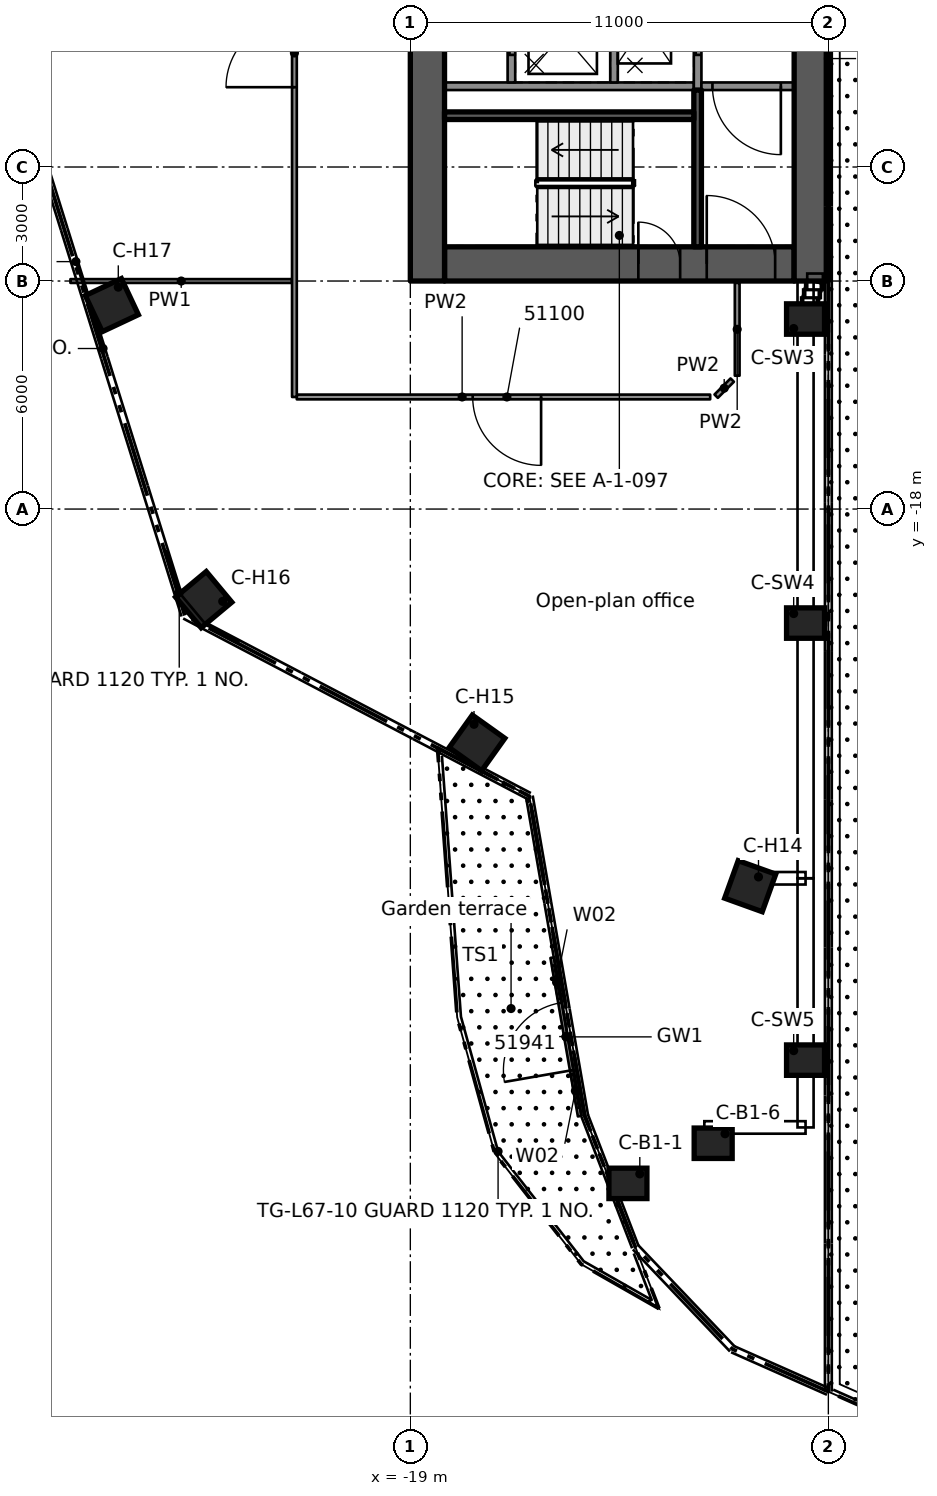
"""IFC4 building model, lengths in metres.
Left out: names, types, materials, properties, quantities, classifications, styles, units other than length and angle.
Written with IfcOpenShell. Run it as: python <this file> out.ifc"""

import sys

from ifc_helpers import new_model, si_unit, direction, frame, frame_2d, origin, origin_2d, place, context, subcontext, project, spatial, rectangle, extrude, element, fill, save


model = new_model("IFC4")
c1 = context("Model", 3, precision=1e-05, world=origin(), true_north=direction((0.0, 1.0)))
c2 = subcontext(c1, "Body", "Model", "MODEL_VIEW")
j1 = project(units=[si_unit("LENGTHUNIT", "METRE"), si_unit("PLANEANGLEUNIT", "RADIAN")], contexts=[c1])
p1 = place(None, origin())
s1 = spatial("IfcSite", under=j1, at=p1, CompositionType="ELEMENT")
p2 = place(p1, origin())
s2 = spatial("IfcBuilding", under=s1, at=p2, CompositionType="ELEMENT")
p3 = place(p2, frame((0.0, 0.0, 253.5)))
s3 = spatial("IfcBuildingStorey", under=s2, at=p3, CompositionType="ELEMENT", Elevation=253.5)
p4 = place(p3, frame((-18.1, -11.55, 0.0), z_axis=(0.0, 0.0, 1.0), x_axis=(1.0, 0.0, 0.0)))
e1 = element("IfcWall", 1, at=p4, inside=s3, PredefinedType="SHEAR", context=c2, shape_type="SweptSolid", body=[
    extrude(rectangle(XDim=9.2, YDim=0.9, at=frame_2d((4.6, 0.0))), origin(), (0.0, 0.0, 1.0), 3.5),
])
p5 = place(p4, frame((6.9, 0.0, 0.0)))
e2 = element("IfcOpeningElement", 2, at=p5, cuts=e1, PredefinedType="OPENING", context=c2, shape_type="SweptSolid", body=[
    extrude(rectangle(XDim=1.8, YDim=2.1, at=frame_2d((0.9, 1.05))), frame((0.0, 0.46, 0.0), z_axis=(0.0, -1.0, 0.0), x_axis=(1.0, 0.0, 0.0)), (0.0, 0.0, 1.0), 0.92),
])
p6 = place(p4, frame((5.1, 0.0, 0.0)))
e3 = element("IfcOpeningElement", 3, at=p6, cuts=e1, PredefinedType="OPENING", context=c2, shape_type="SweptSolid", body=[
    extrude(rectangle(XDim=1.1, YDim=2.1, at=frame_2d((0.55, 1.05))), frame((0.0, 0.46, 0.0), z_axis=(0.0, -1.0, 0.0), x_axis=(1.0, 0.0, 0.0)), (0.0, 0.0, 1.0), 0.92),
])
p7 = place(p3, frame((-18.55, -12.0, 0.0), z_axis=(0.0, 0.0, 1.0), x_axis=(0.0, 1.0, 0.0)))
e4 = element("IfcWall", 4, at=p7, inside=s3, PredefinedType="SHEAR", context=c2, shape_type="SweptSolid", body=[
    extrude(rectangle(XDim=24.0, YDim=0.9, at=frame_2d((12.0, 0.0))), origin(), (0.0, 0.0, 1.0), 3.5),
])
p8 = place(p7, frame((10.1, 0.0, 0.0)))
e5 = element("IfcOpeningElement", 5, at=p8, cuts=e4, PredefinedType="OPENING", context=c2, shape_type="SweptSolid", body=[
    extrude(rectangle(XDim=1.8, YDim=2.1, at=frame_2d((0.9, 1.05))), frame((0.0, 0.46, 0.0), z_axis=(0.0, -1.0, 0.0), x_axis=(1.0, 0.0, 0.0)), (0.0, 0.0, 1.0), 0.92),
])
p9 = place(p3, frame((-8.45, -12.0, 0.0), z_axis=(0.0, 0.0, 1.0), x_axis=(0.0, 1.0, 0.0)))
e6 = element("IfcWall", 6, at=p9, inside=s3, PredefinedType="SHEAR", context=c2, shape_type="SweptSolid", body=[
    extrude(rectangle(XDim=24.0, YDim=0.9, at=frame_2d((12.0, 0.0))), origin(), (0.0, 0.0, 1.0), 3.5),
])
for number, where, z_axis, x_axis in (
    (7, (-13.274, -35.743, 0.0), (0.0, 0.0, 1.0), (1.0, 0.0, 0.0)),
    (8, (-11.031, -34.687, 0.0), (0.0, 0.0, 1.0), (1.0, 0.0, 0.0)),
):
    element("IfcColumn", number, at=place(p3, frame(where, z_axis=z_axis, x_axis=x_axis)), inside=s3, PredefinedType="COLUMN", context=c2, shape_type="SweptSolid", body=[
        extrude(rectangle(XDim=1.0, YDim=0.8, at=origin_2d()), origin(), (0.0, 0.0, 1.0), 3.5),
    ])
for number, where, z_axis, x_axis in (
    (9, (-10.056, -27.923, 0.0), (0.0, 0.0, 1.0), (-0.339, -0.941, 0.0)),
    (10, (-17.246, -24.154, 0.0), (0.0, 0.0, 1.0), (-0.581, -0.814, 0.0)),
    (11, (-24.437, -20.384, 0.0), (0.0, 0.0, 1.0), (-0.768, -0.641, 0.0)),
    (12, (-26.855, -12.634, 0.0), (0.0, 0.0, 1.0), (-0.905, -0.426, 0.0)),
):
    element("IfcColumn", number, at=place(p3, frame(where, z_axis=z_axis, x_axis=x_axis)), inside=s3, PredefinedType="COLUMN", context=c2, shape_type="SweptSolid", body=[
        extrude(rectangle(XDim=1.05, YDim=1.05, at=origin_2d()), origin(), (0.0, 0.0, 1.0), 3.5),
    ])
for number, where, z_axis, x_axis in (
    (13, (-8.6, -13.0, 0.0), (0.0, 0.0, 1.0), (1.0, 0.0, 0.0)),
    (14, (-8.6, -21.0, 0.0), (0.0, 0.0, 1.0), (1.0, 0.0, 0.0)),
    (15, (-8.6, -32.5, 0.0), (0.0, 0.0, 1.0), (1.0, 0.0, 0.0)),
):
    element("IfcColumn", number, at=place(p3, frame(where, z_axis=z_axis, x_axis=x_axis)), inside=s3, PredefinedType="COLUMN", context=c2, shape_type="SweptSolid", body=[
        extrude(rectangle(XDim=1.0, YDim=0.8, at=origin_2d()), origin(), (0.0, 0.0, 1.0), 3.5),
    ])
p10 = place(p3, frame((-11.54, -6.875, 0.0), z_axis=(0.0, 0.0, 1.0), x_axis=(-1.0, 0.0, 0.0)))
e16 = element("IfcWall", 16, at=p10, inside=s3, PredefinedType="SOLIDWALL", context=c2, shape_type="SweptSolid", body=[
    extrude(rectangle(XDim=6.56, YDim=0.2, at=frame_2d((3.28, 0.0))), origin(), (0.0, 0.0, 1.0), 3.09),
])
p11 = place(p3, frame((-11.44, -6.975, 0.0), z_axis=(0.0, 0.0, 1.0), x_axis=(0.0, 1.0, 0.0)))
e17 = element("IfcWall", 17, at=p11, inside=s3, PredefinedType="SOLIDWALL", context=c2, shape_type="SweptSolid", body=[
    extrude(rectangle(XDim=13.95, YDim=0.2, at=frame_2d((6.975, 0.0))), origin(), (0.0, 0.0, 1.0), 3.09),
])
p12 = place(p11, frame((0.925, 0.0, 0.0)))
e18 = element("IfcOpeningElement", 18, at=p12, cuts=e17, PredefinedType="OPENING", context=c2, shape_type="SweptSolid", body=[
    extrude(rectangle(XDim=1.1, YDim=2.1, at=frame_2d((0.55, 1.05))), frame((0.0, 0.11, 0.0), z_axis=(0.0, -1.0, 0.0), x_axis=(1.0, 0.0, 0.0)), (0.0, 0.0, 1.0), 0.22),
])
p13 = place(p11, frame((3.675, 0.0, 0.0)))
e19 = element("IfcOpeningElement", 19, at=p13, cuts=e17, PredefinedType="OPENING", context=c2, shape_type="SweptSolid", body=[
    extrude(rectangle(XDim=1.1, YDim=2.1, at=frame_2d((0.55, 1.05))), frame((0.0, 0.11, 0.0), z_axis=(0.0, -1.0, 0.0), x_axis=(1.0, 0.0, 0.0)), (0.0, 0.0, 1.0), 0.22),
])
p14 = place(p11, frame((11.925, 0.0, 0.0)))
e20 = element("IfcOpeningElement", 20, at=p14, cuts=e17, PredefinedType="OPENING", context=c2, shape_type="SweptSolid", body=[
    extrude(rectangle(XDim=1.1, YDim=2.1, at=frame_2d((0.55, 1.05))), frame((0.0, 0.11, 0.0), z_axis=(0.0, -1.0, 0.0), x_axis=(1.0, 0.0, 0.0)), (0.0, 0.0, 1.0), 0.22),
])
p15 = place(p11, frame((6.575, 0.0, 0.0)))
e21 = element("IfcOpeningElement", 21, at=p15, cuts=e17, PredefinedType="OPENING", context=c2, shape_type="SweptSolid", body=[
    extrude(rectangle(XDim=0.8, YDim=2.1, at=frame_2d((0.4, 1.05))), frame((0.0, 0.11, 0.0), z_axis=(0.0, -1.0, 0.0), x_axis=(1.0, 0.0, 0.0)), (0.0, 0.0, 1.0), 0.22),
])
p16 = place(p3, frame((-13.64, -6.775, 0.0), z_axis=(0.0, 0.0, 1.0), x_axis=(0.0, 1.0, 0.0)))
e22 = element("IfcWall", 22, at=p16, inside=s3, PredefinedType="SOLIDWALL", context=c2, shape_type="SweptSolid", body=[
    extrude(rectangle(XDim=2.55, YDim=0.2, at=frame_2d((1.275, 0.0))), origin(), (0.0, 0.0, 1.0), 3.09),
])
p17 = place(p3, frame((-16.34, -6.775, 0.0), z_axis=(0.0, 0.0, 1.0), x_axis=(0.0, 1.0, 0.0)))
e23 = element("IfcWall", 23, at=p17, inside=s3, PredefinedType="SOLIDWALL", context=c2, shape_type="SweptSolid", body=[
    extrude(rectangle(XDim=2.75, YDim=0.2, at=frame_2d((1.375, 0.0))), origin(), (0.0, 0.0, 1.0), 3.09),
])
p18 = place(p17, frame((0.725, 0.0, 0.0)))
e24 = element("IfcOpeningElement", 24, at=p18, cuts=e23, PredefinedType="OPENING", context=c2, shape_type="SweptSolid", body=[
    extrude(rectangle(XDim=1.1, YDim=2.1, at=frame_2d((0.55, 1.05))), frame((0.0, 0.11, 0.0), z_axis=(0.0, -1.0, 0.0), x_axis=(1.0, 0.0, 0.0)), (0.0, 0.0, 1.0), 0.22),
])
p19 = place(p3, frame((-11.44, -11.1, 0.0), z_axis=(0.0, 0.0, 1.0), x_axis=(0.0, 1.0, 0.0)))
e25 = element("IfcWall", 25, at=p19, inside=s3, PredefinedType="SOLIDWALL", context=c2, shape_type="SweptSolid", body=[
    extrude(rectangle(XDim=4.125, YDim=0.2, at=frame_2d((2.062, 0.0))), origin(), (0.0, 0.0, 1.0), 3.09),
])
p20 = place(p3, frame((-11.54, -7.65, 0.0), z_axis=(0.0, 0.0, 1.0), x_axis=(-1.0, 0.0, 0.0)))
e26 = element("IfcWall", 26, at=p20, inside=s3, PredefinedType="SOLIDWALL", context=c2, shape_type="SweptSolid", body=[
    extrude(rectangle(XDim=6.56, YDim=0.2, at=frame_2d((3.28, 0.0))), origin(), (0.0, 0.0, 1.0), 3.09),
])
p21 = place(p3, frame((-8.9, -6.875, 0.0), z_axis=(0.0, 0.0, 1.0), x_axis=(-1.0, 0.0, 0.0)))
e27 = element("IfcWall", 27, at=p21, inside=s3, PredefinedType="PARTITIONING", context=c2, shape_type="SweptSolid", body=[
    extrude(rectangle(XDim=2.44, YDim=0.2, at=frame_2d((1.22, 0.0))), origin(), (0.0, 0.0, 1.0), 3.09),
])
p22 = place(p21, frame((0.35, 0.0, 0.0)))
e28 = element("IfcOpeningElement", 28, at=p22, cuts=e27, PredefinedType="OPENING", context=c2, shape_type="SweptSolid", body=[
    extrude(rectangle(XDim=1.8, YDim=2.1, at=frame_2d((0.9, 1.05))), frame((0.0, 0.11, 0.0), z_axis=(0.0, -1.0, 0.0), x_axis=(1.0, 0.0, 0.0)), (0.0, 0.0, 1.0), 0.22),
])
p23 = place(p3, frame((-14.542, -33.973, 0.0), z_axis=(0.0, 0.0, 1.0), x_axis=(-0.170803150689, 0.985305172885, 0.0)))
e29 = element("IfcWall", 29, at=p23, inside=s3, PredefinedType="STANDARD", context=c2, shape_type="SweptSolid", body=[
    extrude(rectangle(XDim=4.232, YDim=0.1, at=frame_2d((2.116, 0.0))), origin(), (0.0, 0.0, 1.0), 3.1),
])
p24 = place(p23, frame((1.224, 0.0, 0.0)))
e30 = element("IfcOpeningElement", 30, at=p24, cuts=e29, PredefinedType="OPENING", context=c2, shape_type="SweptSolid", body=[
    extrude(rectangle(XDim=1.8, YDim=2.4, at=frame_2d((0.9, 1.2))), frame((0.0, 0.06, 0.0), z_axis=(0.0, -1.0, 0.0), x_axis=(1.0, 0.0, 0.0)), (0.0, 0.0, 1.0), 0.12),
])
p25 = place(p23, frame((0.224, 0.0, 0.0)))
e31 = element("IfcOpeningElement", 31, at=p25, cuts=e29, PredefinedType="OPENING", context=c2, shape_type="SweptSolid", body=[
    extrude(rectangle(XDim=0.9, YDim=2.4, at=frame_2d((0.45, 1.2))), frame((0.0, 0.06, 0.0), z_axis=(0.0, -1.0, 0.0), x_axis=(1.0, 0.0, 0.0)), (0.0, 0.0, 1.0), 0.12),
])
p26 = place(p23, frame((3.124, 0.0, 0.0)))
e32 = element("IfcOpeningElement", 32, at=p26, cuts=e29, PredefinedType="OPENING", context=c2, shape_type="SweptSolid", body=[
    extrude(rectangle(XDim=0.9, YDim=2.4, at=frame_2d((0.45, 1.2))), frame((0.0, 0.06, 0.0), z_axis=(0.0, -1.0, 0.0), x_axis=(1.0, 0.0, 0.0)), (0.0, 0.0, 1.0), 0.12),
])
p27 = place(p3, frame((-11.11, -15.051, 0.0), z_axis=(0.0, 0.0, 1.0), x_axis=(-1.0, 0.0, 0.0)))
e33 = element("IfcWall", 33, at=p27, inside=s3, PredefinedType="PARTITIONING", context=c2, shape_type="SweptSolid", body=[
    extrude(rectangle(XDim=10.878, YDim=0.125, at=frame_2d((5.439, 0.0))), origin(), (0.0, 0.0, 1.0), 3.08),
])
p28 = place(p27, frame((4.449, 0.0, 0.0)))
e34 = element("IfcOpeningElement", 34, at=p28, cuts=e33, PredefinedType="OPENING", context=c2, shape_type="SweptSolid", body=[
    extrude(rectangle(XDim=1.8, YDim=2.1, at=frame_2d((0.9, 1.05))), frame((0.0, 0.073, 0.0), z_axis=(0.0, -1.0, 0.0), x_axis=(1.0, 0.0, 0.0)), (0.0, 0.0, 1.0), 0.145),
])
p29 = place(p3, frame((-27.944, -12.0, 0.0), z_axis=(0.0, 0.0, 1.0), x_axis=(1.0, 0.0, 0.0)))
e35 = element("IfcWall", 35, at=p29, inside=s3, PredefinedType="PARTITIONING", context=c2, shape_type="SweptSolid", body=[
    extrude(rectangle(XDim=5.831, YDim=0.1, at=frame_2d((2.916, 0.0))), origin(), (0.0, 0.0, 1.0), 3.08),
])
p30 = place(p3, frame((-10.952, -15.03, 0.0), z_axis=(0.0, 0.0, 1.0), x_axis=(0.706902680526, 0.707310822952, 0.0)))
e36 = element("IfcWall", 36, at=p30, inside=s3, PredefinedType="PARTITIONING", context=c2, shape_type="SweptSolid", body=[
    extrude(rectangle(XDim=0.598, YDim=0.125, at=frame_2d((0.299, 0.0))), origin(), (0.0, 0.0, 1.0), 3.08),
])
p31 = place(p3, frame((-10.399, -14.491, 0.0), z_axis=(0.0, 0.0, 1.0), x_axis=(0.0, 1.0, 0.0)))
e37 = element("IfcWall", 37, at=p31, inside=s3, PredefinedType="PARTITIONING", context=c2, shape_type="SweptSolid", body=[
    extrude(rectangle(XDim=2.441, YDim=0.125, at=frame_2d((1.22, 0.0))), origin(), (0.0, 0.0, 1.0), 3.08),
])
p32 = place(p3, frame((-22.05, -15.051, 0.0), z_axis=(0.0, 0.0, 1.0), x_axis=(0.0, 1.0, 0.0)))
e38 = element("IfcWall", 38, at=p32, inside=s3, PredefinedType="PARTITIONING", context=c2, shape_type="SweptSolid", body=[
    extrude(rectangle(XDim=30.102, YDim=0.125, at=frame_2d((15.051, 0.0))), origin(), (0.0, 0.0, 1.0), 3.08),
])
p33 = place(p32, frame((8.151, 0.0, 0.0)))
e39 = element("IfcOpeningElement", 39, at=p33, cuts=e38, PredefinedType="OPENING", context=c2, shape_type="SweptSolid", body=[
    extrude(rectangle(XDim=1.8, YDim=2.1, at=frame_2d((0.9, 1.05))), frame((0.0, 0.073, 0.0), z_axis=(0.0, -1.0, 0.0), x_axis=(1.0, 0.0, 0.0)), (0.0, 0.0, 1.0), 0.145),
])
p34 = place(p32, frame((23.652, 0.0, 0.0)))
e40 = element("IfcOpeningElement", 40, at=p34, cuts=e38, PredefinedType="OPENING", context=c2, shape_type="SweptSolid", body=[
    extrude(rectangle(XDim=0.9, YDim=2.1, at=frame_2d((0.45, 1.05))), frame((0.0, 0.073, 0.0), z_axis=(0.0, -1.0, 0.0), x_axis=(1.0, 0.0, 0.0)), (0.0, 0.0, 1.0), 0.145),
])
p35 = place(p32, frame((17.403, 0.0, 0.0)))
e41 = element("IfcOpeningElement", 41, at=p35, cuts=e38, PredefinedType="OPENING", context=c2, shape_type="SweptSolid", body=[
    extrude(rectangle(XDim=1.1, YDim=2.1, at=frame_2d((0.55, 1.05))), frame((0.0, 0.073, 0.0), z_axis=(0.0, -1.0, 0.0), x_axis=(1.0, 0.0, 0.0)), (0.0, 0.0, 1.0), 0.145),
])
p36 = place(p12, origin())
e42 = element("IfcDoor", 42, at=p36, inside=s3, OperationType="DOUBLE_DOOR_SLIDING", PredefinedType="DOOR", context=c2, shape_type="SweptSolid", body=[
    extrude(rectangle(XDim=1.1, YDim=2.1, at=frame_2d((0.55, 1.05))), frame((0.0, 0.025, 0.0), z_axis=(0.0, -1.0, 0.0), x_axis=(1.0, 0.0, 0.0)), (0.0, 0.0, 1.0), 0.05),
])
fill(e18, e42)
p37 = place(p18, origin())
e43 = element("IfcDoor", 43, at=p37, inside=s3, OperationType="DOUBLE_DOOR_SLIDING", PredefinedType="DOOR", context=c2, shape_type="SweptSolid", body=[
    extrude(rectangle(XDim=1.1, YDim=2.1, at=frame_2d((0.55, 1.05))), frame((0.0, 0.025, 0.0), z_axis=(0.0, -1.0, 0.0), x_axis=(1.0, 0.0, 0.0)), (0.0, 0.0, 1.0), 0.05),
])
fill(e24, e43)
p38 = place(p22, origin())
e44 = element("IfcDoor", 44, at=p38, inside=s3, OperationType="DOUBLE_DOOR_DOUBLE_SWING", PredefinedType="DOOR", context=c2, shape_type="SweptSolid", body=[
    extrude(rectangle(XDim=1.8, YDim=2.1, at=frame_2d((0.9, 1.05))), frame((0.0, 0.025, 0.0), z_axis=(0.0, -1.0, 0.0), x_axis=(1.0, 0.0, 0.0)), (0.0, 0.0, 1.0), 0.05),
])
fill(e28, e44)
p39 = place(p5, origin())
e45 = element("IfcDoor", 45, at=p39, inside=s3, OperationType="SINGLE_SWING_RIGHT", PredefinedType="DOOR", context=c2, shape_type="SweptSolid", body=[
    extrude(rectangle(XDim=1.8, YDim=2.1, at=frame_2d((0.9, 1.05))), frame((0.0, 0.025, 0.0), z_axis=(0.0, -1.0, 0.0), x_axis=(1.0, 0.0, 0.0)), (0.0, 0.0, 1.0), 0.05),
])
fill(e2, e45)
p40 = place(p6, origin())
e46 = element("IfcDoor", 46, at=p40, inside=s3, OperationType="SINGLE_SWING_RIGHT", PredefinedType="DOOR", context=c2, shape_type="SweptSolid", body=[
    extrude(rectangle(XDim=1.1, YDim=2.1, at=frame_2d((0.55, 1.05))), frame((0.0, 0.025, 0.0), z_axis=(0.0, -1.0, 0.0), x_axis=(1.0, 0.0, 0.0)), (0.0, 0.0, 1.0), 0.05),
])
fill(e3, e46)
p41 = place(p24, origin())
e47 = element("IfcDoor", 47, at=p41, inside=s3, OperationType="DOUBLE_DOOR_SINGLE_SWING", PredefinedType="DOOR", context=c2, shape_type="SweptSolid", body=[
    extrude(rectangle(XDim=1.8, YDim=2.4, at=frame_2d((0.9, 1.2))), frame((0.0, 0.025, 0.0), z_axis=(0.0, -1.0, 0.0), x_axis=(1.0, 0.0, 0.0)), (0.0, 0.0, 1.0), 0.05),
])
fill(e30, e47)
p42 = place(p25, origin())
e48 = element("IfcWindow", 48, at=p42, inside=s3, PartitioningType="SINGLE_PANEL", PredefinedType="WINDOW", context=c2, shape_type="SweptSolid", body=[
    extrude(rectangle(XDim=0.9, YDim=2.4, at=frame_2d((0.45, 1.2))), frame((0.0, 0.03, 0.0), z_axis=(0.0, -1.0, 0.0), x_axis=(1.0, 0.0, 0.0)), (0.0, 0.0, 1.0), 0.06),
])
fill(e31, e48)
p43 = place(p26, origin())
e49 = element("IfcWindow", 49, at=p43, inside=s3, PartitioningType="SINGLE_PANEL", PredefinedType="WINDOW", context=c2, shape_type="SweptSolid", body=[
    extrude(rectangle(XDim=0.9, YDim=2.4, at=frame_2d((0.45, 1.2))), frame((0.0, 0.03, 0.0), z_axis=(0.0, -1.0, 0.0), x_axis=(1.0, 0.0, 0.0)), (0.0, 0.0, 1.0), 0.06),
])
fill(e32, e49)
p44 = place(p28, origin())
e50 = element("IfcDoor", 50, at=p44, inside=s3, OperationType="DOUBLE_DOOR_SINGLE_SWING", PredefinedType="DOOR", context=c2, shape_type="SweptSolid", body=[
    extrude(rectangle(XDim=1.8, YDim=2.1, at=frame_2d((0.9, 1.05))), frame((0.0, 0.025, 0.0), z_axis=(0.0, -1.0, 0.0), x_axis=(1.0, 0.0, 0.0)), (0.0, 0.0, 1.0), 0.05),
])
fill(e34, e50)
p45 = place(p33, origin())
e51 = element("IfcDoor", 51, at=p45, inside=s3, OperationType="DOUBLE_DOOR_SINGLE_SWING", PredefinedType="DOOR", context=c2, shape_type="SweptSolid", body=[
    extrude(rectangle(XDim=1.8, YDim=2.1, at=frame_2d((0.9, 1.05))), frame((0.0, 0.025, 0.0), z_axis=(0.0, -1.0, 0.0), x_axis=(1.0, 0.0, 0.0)), (0.0, 0.0, 1.0), 0.05),
])
fill(e39, e51)
save(model, sys.argv[1])
